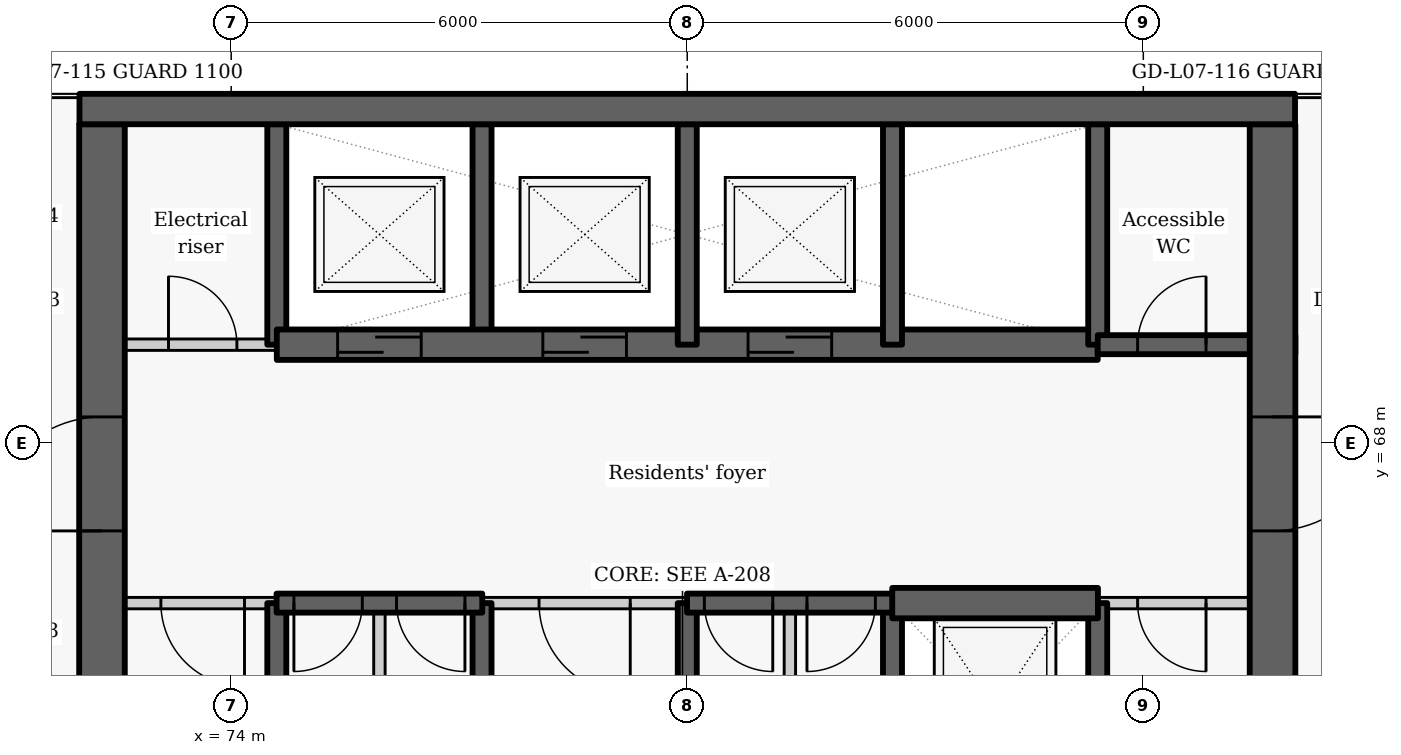
"""IFC4 building model, lengths in metres.
Left out: names, types, materials, properties, quantities, classifications, styles, units other than length and angle.
Written with IfcOpenShell. Run it as: python <this file> out.ifc"""

import sys

from ifc_helpers import new_model, si_unit, direction, frame, frame_2d, origin, place, context, subcontext, project, spatial, rectangle, extrude, element, fill, save


model = new_model("IFC4")
c1 = context("Model", 3, precision=1e-05, world=origin(), true_north=direction((0.0, 1.0)))
c2 = subcontext(c1, "Body", "Model", "MODEL_VIEW")
j1 = project(units=[si_unit("LENGTHUNIT", "METRE"), si_unit("PLANEANGLEUNIT", "RADIAN")], contexts=[c1])
p1 = place(None, origin())
s1 = spatial("IfcSite", under=j1, at=p1, CompositionType="ELEMENT")
p2 = place(p1, origin())
s2 = spatial("IfcBuilding", under=s1, at=p2, CompositionType="ELEMENT")
p3 = place(p2, frame((0.0, 0.0, 31.5)))
s3 = spatial("IfcBuildingStorey", under=s2, at=p3, CompositionType="ELEMENT", Elevation=31.5)
p4 = place(p3, frame((74.6, 63.1, -0.275), z_axis=(0.0, 0.0, 1.0), x_axis=(0.0, 1.0, 0.0)))
e1 = element("IfcWall", 1, at=p4, inside=s3, PredefinedType="SHEAR", context=c2, shape_type="SweptSolid", body=[
    extrude(rectangle(XDim=2.8, YDim=0.25, at=frame_2d((1.4, 0.0))), origin(), (0.0, 0.0, 1.0), 3.3),
])
p5 = place(p3, frame((74.6, 69.3, -0.275), z_axis=(0.0, 0.0, 1.0), x_axis=(0.0, 1.0, 0.0)))
e2 = element("IfcWall", 2, at=p5, inside=s3, PredefinedType="SHEAR", context=c2, shape_type="SweptSolid", body=[
    extrude(rectangle(XDim=2.9, YDim=0.25, at=frame_2d((1.45, 0.0))), origin(), (0.0, 0.0, 1.0), 3.3),
])
p6 = place(p3, frame((72.0, 69.3, 0.0), z_axis=(0.0, 0.0, 1.0), x_axis=(1.0, 0.0, 0.0)))
e3 = element("IfcWall", 3, at=p6, inside=s3, PredefinedType="PARTITIONING", context=c2, shape_type="SweptSolid", body=[
    extrude(rectangle(XDim=2.6, YDim=0.15, at=frame_2d((1.3, 0.0))), origin(), (0.0, 0.0, 1.0), 3.025),
])
p7 = place(p6, frame((1.175, 0.0, 0.0)))
e4 = element("IfcOpeningElement", 4, at=p7, cuts=e3, PredefinedType="OPENING", context=c2, shape_type="SweptSolid", body=[
    extrude(rectangle(XDim=0.9, YDim=2.1, at=frame_2d((0.45, 1.05))), frame((0.0, 0.085, 0.0), z_axis=(0.0, -1.0, 0.0), x_axis=(1.0, 0.0, 0.0)), (0.0, 0.0, 1.0), 0.17),
])
p8 = place(p3, frame((72.3, 63.1, -0.275), z_axis=(0.0, 0.0, 1.0), x_axis=(0.0, 1.0, 0.0)))
e5 = element("IfcWall", 5, at=p8, inside=s3, PredefinedType="SHEAR", context=c2, shape_type="SweptSolid", body=[
    extrude(rectangle(XDim=9.1, YDim=0.6, at=frame_2d((4.55, 0.0))), origin(), (0.0, 0.0, 1.0), 3.3),
])
p9 = place(p8, frame((3.75, 0.0, 0.275)))
e6 = element("IfcOpeningElement", 6, at=p9, cuts=e5, PredefinedType="OPENING", context=c2, shape_type="SweptSolid", body=[
    extrude(rectangle(XDim=1.5, YDim=2.1, at=frame_2d((0.75, 1.05))), frame((0.0, 0.31, 0.0), z_axis=(0.0, -1.0, 0.0), x_axis=(1.0, 0.0, 0.0)), (0.0, 0.0, 1.0), 0.62),
])
p10 = place(p3, frame((77.3, 63.1, -0.275), z_axis=(0.0, 0.0, 1.0), x_axis=(0.0, 1.0, 0.0)))
e7 = element("IfcWall", 7, at=p10, inside=s3, PredefinedType="SHEAR", context=c2, shape_type="SweptSolid", body=[
    extrude(rectangle(XDim=2.8, YDim=0.25, at=frame_2d((1.4, 0.0))), origin(), (0.0, 0.0, 1.0), 3.3),
])
p11 = place(p3, frame((77.3, 69.3, -0.275), z_axis=(0.0, 0.0, 1.0), x_axis=(0.0, 1.0, 0.0)))
e8 = element("IfcWall", 8, at=p11, inside=s3, PredefinedType="SHEAR", context=c2, shape_type="SweptSolid", body=[
    extrude(rectangle(XDim=2.9, YDim=0.25, at=frame_2d((1.45, 0.0))), origin(), (0.0, 0.0, 1.0), 3.3),
])
p12 = place(p3, frame((74.6, 69.3, -0.275), z_axis=(0.0, 0.0, 1.0), x_axis=(1.0, 0.0, 0.0)))
e9 = element("IfcWall", 9, at=p12, inside=s3, PredefinedType="SHEAR", context=c2, shape_type="SweptSolid", body=[
    extrude(rectangle(XDim=10.8, YDim=0.4, at=frame_2d((5.4, 0.0))), origin(), (0.0, 0.0, 1.0), 3.3),
])
p13 = place(p12, frame((0.8, 0.0, 0.275)))
e10 = element("IfcOpeningElement", 10, at=p13, cuts=e9, PredefinedType="OPENING", context=c2, shape_type="SweptSolid", body=[
    extrude(rectangle(XDim=1.1, YDim=2.1, at=frame_2d((0.55, 1.05))), frame((0.0, 0.21, 0.0), z_axis=(0.0, -1.0, 0.0), x_axis=(1.0, 0.0, 0.0)), (0.0, 0.0, 1.0), 0.42),
])
p14 = place(p12, frame((3.5, 0.0, 0.275)))
e11 = element("IfcOpeningElement", 11, at=p14, cuts=e9, PredefinedType="OPENING", context=c2, shape_type="SweptSolid", body=[
    extrude(rectangle(XDim=1.1, YDim=2.1, at=frame_2d((0.55, 1.05))), frame((0.0, 0.21, 0.0), z_axis=(0.0, -1.0, 0.0), x_axis=(1.0, 0.0, 0.0)), (0.0, 0.0, 1.0), 0.42),
])
p15 = place(p12, frame((6.2, 0.0, 0.275)))
e12 = element("IfcOpeningElement", 12, at=p15, cuts=e9, PredefinedType="OPENING", context=c2, shape_type="SweptSolid", body=[
    extrude(rectangle(XDim=1.1, YDim=2.1, at=frame_2d((0.55, 1.05))), frame((0.0, 0.21, 0.0), z_axis=(0.0, -1.0, 0.0), x_axis=(1.0, 0.0, 0.0)), (0.0, 0.0, 1.0), 0.42),
])
p16 = place(p3, frame((80.0, 63.1, -0.275), z_axis=(0.0, 0.0, 1.0), x_axis=(0.0, 1.0, 0.0)))
e13 = element("IfcWall", 13, at=p16, inside=s3, PredefinedType="SHEAR", context=c2, shape_type="SweptSolid", body=[
    extrude(rectangle(XDim=2.8, YDim=0.25, at=frame_2d((1.4, 0.0))), origin(), (0.0, 0.0, 1.0), 3.3),
])
p17 = place(p3, frame((80.0, 69.3, -0.275), z_axis=(0.0, 0.0, 1.0), x_axis=(0.0, 1.0, 0.0)))
e14 = element("IfcWall", 14, at=p17, inside=s3, PredefinedType="SHEAR", context=c2, shape_type="SweptSolid", body=[
    extrude(rectangle(XDim=2.9, YDim=0.25, at=frame_2d((1.45, 0.0))), origin(), (0.0, 0.0, 1.0), 3.3),
])
p18 = place(p3, frame((82.7, 63.1, -0.275), z_axis=(0.0, 0.0, 1.0), x_axis=(0.0, 1.0, 0.0)))
e15 = element("IfcWall", 15, at=p18, inside=s3, PredefinedType="SHEAR", context=c2, shape_type="SweptSolid", body=[
    extrude(rectangle(XDim=2.8, YDim=0.25, at=frame_2d((1.4, 0.0))), origin(), (0.0, 0.0, 1.0), 3.3),
])
p19 = place(p3, frame((82.7, 69.3, -0.275), z_axis=(0.0, 0.0, 1.0), x_axis=(0.0, 1.0, 0.0)))
e16 = element("IfcWall", 16, at=p19, inside=s3, PredefinedType="SHEAR", context=c2, shape_type="SweptSolid", body=[
    extrude(rectangle(XDim=2.9, YDim=0.25, at=frame_2d((1.45, 0.0))), origin(), (0.0, 0.0, 1.0), 3.3),
])
p20 = place(p3, frame((85.4, 63.1, -0.275), z_axis=(0.0, 0.0, 1.0), x_axis=(0.0, 1.0, 0.0)))
e17 = element("IfcWall", 17, at=p20, inside=s3, PredefinedType="SHEAR", context=c2, shape_type="SweptSolid", body=[
    extrude(rectangle(XDim=2.8, YDim=0.25, at=frame_2d((1.4, 0.0))), origin(), (0.0, 0.0, 1.0), 3.3),
])
p21 = place(p3, frame((85.4, 69.3, -0.275), z_axis=(0.0, 0.0, 1.0), x_axis=(0.0, 1.0, 0.0)))
e18 = element("IfcWall", 18, at=p21, inside=s3, PredefinedType="SHEAR", context=c2, shape_type="SweptSolid", body=[
    extrude(rectangle(XDim=2.9, YDim=0.25, at=frame_2d((1.45, 0.0))), origin(), (0.0, 0.0, 1.0), 3.3),
])
p22 = place(p3, frame((85.4, 69.3, -0.275), z_axis=(0.0, 0.0, 1.0), x_axis=(1.0, 0.0, 0.0)))
e19 = element("IfcWall", 19, at=p22, inside=s3, PredefinedType="SHEAR", context=c2, shape_type="SweptSolid", body=[
    extrude(rectangle(XDim=2.6, YDim=0.25, at=frame_2d((1.3, 0.0))), origin(), (0.0, 0.0, 1.0), 3.3),
])
p23 = place(p22, frame((0.525, 0.0, 0.275)))
e20 = element("IfcOpeningElement", 20, at=p23, cuts=e19, PredefinedType="OPENING", context=c2, shape_type="SweptSolid", body=[
    extrude(rectangle(XDim=0.9, YDim=2.1, at=frame_2d((0.45, 1.05))), frame((0.0, 0.135, 0.0), z_axis=(0.0, -1.0, 0.0), x_axis=(1.0, 0.0, 0.0)), (0.0, 0.0, 1.0), 0.27),
])
p24 = place(p3, frame((87.7, 72.2, -0.275), z_axis=(0.0, 0.0, 1.0), x_axis=(0.0, -1.0, 0.0)))
e21 = element("IfcWall", 21, at=p24, inside=s3, PredefinedType="SHEAR", context=c2, shape_type="SweptSolid", body=[
    extrude(rectangle(XDim=15.6, YDim=0.6, at=frame_2d((7.8, 0.0))), origin(), (0.0, 0.0, 1.0), 3.3),
])
p25 = place(p24, frame((3.85, 0.0, 0.275)))
e22 = element("IfcOpeningElement", 22, at=p25, cuts=e21, PredefinedType="OPENING", context=c2, shape_type="SweptSolid", body=[
    extrude(rectangle(XDim=1.5, YDim=2.1, at=frame_2d((0.75, 1.05))), frame((0.0, 0.31, 0.0), z_axis=(0.0, -1.0, 0.0), x_axis=(1.0, 0.0, 0.0)), (0.0, 0.0, 1.0), 0.62),
])
p26 = place(p24, frame((11.8, 0.0, 0.275)))
e23 = element("IfcOpeningElement", 23, at=p26, cuts=e21, PredefinedType="OPENING", context=c2, shape_type="SweptSolid", body=[
    extrude(rectangle(XDim=1.1, YDim=2.1, at=frame_2d((0.55, 1.05))), frame((0.0, 0.31, 0.0), z_axis=(0.0, -1.0, 0.0), x_axis=(1.0, 0.0, 0.0)), (0.0, 0.0, 1.0), 0.62),
])
p27 = place(p3, frame((74.603, 65.9, 0.0), z_axis=(0.0, 0.0, 1.0), x_axis=(-1.0, 0.0, 0.0)))
e24 = element("IfcWall", 24, at=p27, inside=s3, PredefinedType="PARTITIONING", context=c2, shape_type="SweptSolid", body=[
    extrude(rectangle(XDim=2.603, YDim=0.15, at=frame_2d((1.302, 0.0))), origin(), (0.0, 0.0, 1.0), 3.025),
])
p28 = place(p27, frame((0.428, 0.0, 0.0)))
e25 = element("IfcOpeningElement", 25, at=p28, cuts=e24, PredefinedType="OPENING", context=c2, shape_type="SweptSolid", body=[
    extrude(rectangle(XDim=1.1, YDim=2.1, at=frame_2d((0.55, 1.05))), frame((0.0, 0.085, 0.0), z_axis=(0.0, -1.0, 0.0), x_axis=(1.0, 0.0, 0.0)), (0.0, 0.0, 1.0), 0.17),
])
p29 = place(p3, frame((80.003, 65.9, 0.0), z_axis=(0.0, 0.0, 1.0), x_axis=(-1.0, 0.0, 0.0)))
e26 = element("IfcWall", 26, at=p29, inside=s3, PredefinedType="PARTITIONING", context=c2, shape_type="SweptSolid", body=[
    extrude(rectangle(XDim=2.706, YDim=0.15, at=frame_2d((1.353, 0.0))), origin(), (0.0, 0.0, 1.0), 3.025),
])
p30 = place(p29, frame((0.753, 0.0, 0.0)))
e27 = element("IfcOpeningElement", 27, at=p30, cuts=e26, PredefinedType="OPENING", context=c2, shape_type="SweptSolid", body=[
    extrude(rectangle(XDim=1.2, YDim=2.1, at=frame_2d((0.6, 1.05))), frame((0.0, 0.085, 0.0), z_axis=(0.0, -1.0, 0.0), x_axis=(1.0, 0.0, 0.0)), (0.0, 0.0, 1.0), 0.17),
])
p31 = place(p3, frame((88.0, 65.9, 0.0), z_axis=(0.0, 0.0, 1.0), x_axis=(-1.0, 0.0, 0.0)))
e28 = element("IfcWall", 28, at=p31, inside=s3, PredefinedType="PARTITIONING", context=c2, shape_type="SweptSolid", body=[
    extrude(rectangle(XDim=2.603, YDim=0.15, at=frame_2d((1.302, 0.0))), origin(), (0.0, 0.0, 1.0), 3.025),
])
p32 = place(p31, frame((1.175, 0.0, 0.0)))
e29 = element("IfcOpeningElement", 29, at=p32, cuts=e28, PredefinedType="OPENING", context=c2, shape_type="SweptSolid", body=[
    extrude(rectangle(XDim=0.9, YDim=2.1, at=frame_2d((0.45, 1.05))), frame((0.0, 0.085, 0.0), z_axis=(0.0, -1.0, 0.0), x_axis=(1.0, 0.0, 0.0)), (0.0, 0.0, 1.0), 0.17),
])
p33 = place(p3, frame((77.303, 65.9, -0.275), z_axis=(0.0, 0.0, 1.0), x_axis=(-1.0, 0.0, 0.0)))
e30 = element("IfcWall", 30, at=p33, inside=s3, PredefinedType="SHEAR", context=c2, shape_type="SweptSolid", body=[
    extrude(rectangle(XDim=2.706, YDim=0.25, at=frame_2d((1.353, 0.0))), origin(), (0.0, 0.0, 1.0), 3.3),
])
p34 = place(p33, frame((1.578, 0.0, 0.275)))
e31 = element("IfcOpeningElement", 31, at=p34, cuts=e30, PredefinedType="OPENING", context=c2, shape_type="SweptSolid", body=[
    extrude(rectangle(XDim=0.9, YDim=2.1, at=frame_2d((0.45, 1.05))), frame((0.0, 0.135, 0.0), z_axis=(0.0, -1.0, 0.0), x_axis=(1.0, 0.0, 0.0)), (0.0, 0.0, 1.0), 0.27),
])
p35 = place(p33, frame((0.228, 0.0, 0.275)))
e32 = element("IfcOpeningElement", 32, at=p35, cuts=e30, PredefinedType="OPENING", context=c2, shape_type="SweptSolid", body=[
    extrude(rectangle(XDim=0.9, YDim=2.1, at=frame_2d((0.45, 1.05))), frame((0.0, 0.135, 0.0), z_axis=(0.0, -1.0, 0.0), x_axis=(1.0, 0.0, 0.0)), (0.0, 0.0, 1.0), 0.27),
])
p36 = place(p3, frame((82.703, 65.9, -0.275), z_axis=(0.0, 0.0, 1.0), x_axis=(-1.0, 0.0, 0.0)))
e33 = element("IfcWall", 33, at=p36, inside=s3, PredefinedType="SHEAR", context=c2, shape_type="SweptSolid", body=[
    extrude(rectangle(XDim=2.706, YDim=0.25, at=frame_2d((1.353, 0.0))), origin(), (0.0, 0.0, 1.0), 3.3),
])
p37 = place(p36, frame((1.578, 0.0, 0.275)))
e34 = element("IfcOpeningElement", 34, at=p37, cuts=e33, PredefinedType="OPENING", context=c2, shape_type="SweptSolid", body=[
    extrude(rectangle(XDim=0.9, YDim=2.1, at=frame_2d((0.45, 1.05))), frame((0.0, 0.135, 0.0), z_axis=(0.0, -1.0, 0.0), x_axis=(1.0, 0.0, 0.0)), (0.0, 0.0, 1.0), 0.27),
])
p38 = place(p36, frame((0.228, 0.0, 0.275)))
e35 = element("IfcOpeningElement", 35, at=p38, cuts=e33, PredefinedType="OPENING", context=c2, shape_type="SweptSolid", body=[
    extrude(rectangle(XDim=0.9, YDim=2.1, at=frame_2d((0.45, 1.05))), frame((0.0, 0.135, 0.0), z_axis=(0.0, -1.0, 0.0), x_axis=(1.0, 0.0, 0.0)), (0.0, 0.0, 1.0), 0.27),
])
p39 = place(p3, frame((82.697, 65.9, -0.275), z_axis=(0.0, 0.0, 1.0), x_axis=(1.0, 0.0, 0.0)))
e36 = element("IfcWall", 36, at=p39, inside=s3, PredefinedType="SHEAR", context=c2, shape_type="SweptSolid", body=[
    extrude(rectangle(XDim=2.706, YDim=0.4, at=frame_2d((1.353, 0.0))), origin(), (0.0, 0.0, 1.0), 3.3),
])
for number, where, z_axis, x_axis in (
    (37, (75.95, 63.1, 0.0), (0.0, 0.0, 1.0), (0.0, 1.0, 0.0)),
    (38, (81.35, 63.1, 0.0), (0.0, 0.0, 1.0), (0.0, 1.0, 0.0)),
):
    element("IfcWall", number, at=place(p3, frame(where, z_axis=z_axis, x_axis=x_axis)), inside=s3, PredefinedType="PARTITIONING", context=c2, shape_type="SweptSolid", body=[
        extrude(rectangle(XDim=2.8, YDim=0.15, at=frame_2d((1.4, 0.0))), origin(), (0.0, 0.0, 1.0), 3.025),
    ])
p40 = place(p3, frame((72.004, 72.4, -0.275), z_axis=(0.0, 0.0, 1.0), x_axis=(1.0, 0.0, 0.0)))
e39 = element("IfcWall", 39, at=p40, inside=s3, PredefinedType="SHEAR", context=c2, shape_type="SweptSolid", body=[
    extrude(rectangle(XDim=15.992, YDim=0.4, at=frame_2d((7.996, 0.0))), origin(), (0.0, 0.0, 1.0), 3.3),
])
p41 = place(p7, origin())
e40 = element("IfcDoor", 40, at=p41, inside=s3, OperationType="SINGLE_SWING_LEFT", PredefinedType="DOOR", context=c2, shape_type="SweptSolid", body=[
    extrude(rectangle(XDim=0.9, YDim=2.1, at=frame_2d((0.45, 1.05))), frame((0.0, 0.025, 0.0), z_axis=(0.0, -1.0, 0.0), x_axis=(1.0, 0.0, 0.0)), (0.0, 0.0, 1.0), 0.05),
])
fill(e4, e40)
p42 = place(p13, origin())
e41 = element("IfcDoor", 41, at=p42, inside=s3, OperationType="SLIDING_TO_LEFT", PredefinedType="DOOR", context=c2, shape_type="SweptSolid", body=[
    extrude(rectangle(XDim=1.1, YDim=2.1, at=frame_2d((0.55, 1.05))), frame((0.0, 0.025, 0.0), z_axis=(0.0, -1.0, 0.0), x_axis=(1.0, 0.0, 0.0)), (0.0, 0.0, 1.0), 0.05),
])
fill(e10, e41)
p43 = place(p14, origin())
e42 = element("IfcDoor", 42, at=p43, inside=s3, OperationType="SLIDING_TO_LEFT", PredefinedType="DOOR", context=c2, shape_type="SweptSolid", body=[
    extrude(rectangle(XDim=1.1, YDim=2.1, at=frame_2d((0.55, 1.05))), frame((0.0, 0.025, 0.0), z_axis=(0.0, -1.0, 0.0), x_axis=(1.0, 0.0, 0.0)), (0.0, 0.0, 1.0), 0.05),
])
fill(e11, e42)
p44 = place(p15, origin())
e43 = element("IfcDoor", 43, at=p44, inside=s3, OperationType="SLIDING_TO_LEFT", PredefinedType="DOOR", context=c2, shape_type="SweptSolid", body=[
    extrude(rectangle(XDim=1.1, YDim=2.1, at=frame_2d((0.55, 1.05))), frame((0.0, 0.025, 0.0), z_axis=(0.0, -1.0, 0.0), x_axis=(1.0, 0.0, 0.0)), (0.0, 0.0, 1.0), 0.05),
])
fill(e12, e43)
p45 = place(p23, origin())
e44 = element("IfcDoor", 44, at=p45, inside=s3, OperationType="SINGLE_SWING_RIGHT", PredefinedType="DOOR", context=c2, shape_type="SweptSolid", body=[
    extrude(rectangle(XDim=0.9, YDim=2.1, at=frame_2d((0.45, 1.05))), frame((0.0, 0.025, 0.0), z_axis=(0.0, -1.0, 0.0), x_axis=(1.0, 0.0, 0.0)), (0.0, 0.0, 1.0), 0.05),
])
fill(e20, e44)
p46 = place(p28, origin())
e45 = element("IfcDoor", 45, at=p46, inside=s3, OperationType="SINGLE_SWING_LEFT", PredefinedType="DOOR", context=c2, shape_type="SweptSolid", body=[
    extrude(rectangle(XDim=1.1, YDim=2.1, at=frame_2d((0.55, 1.05))), frame((0.0, 0.025, 0.0), z_axis=(0.0, -1.0, 0.0), x_axis=(1.0, 0.0, 0.0)), (0.0, 0.0, 1.0), 0.05),
])
fill(e25, e45)
p47 = place(p34, origin())
e46 = element("IfcDoor", 46, at=p47, inside=s3, OperationType="SINGLE_SWING_RIGHT", PredefinedType="DOOR", context=c2, shape_type="SweptSolid", body=[
    extrude(rectangle(XDim=0.9, YDim=2.1, at=frame_2d((0.45, 1.05))), frame((0.0, 0.025, 0.0), z_axis=(0.0, -1.0, 0.0), x_axis=(1.0, 0.0, 0.0)), (0.0, 0.0, 1.0), 0.05),
])
fill(e31, e46)
p48 = place(p35, origin())
e47 = element("IfcDoor", 47, at=p48, inside=s3, OperationType="SINGLE_SWING_LEFT", PredefinedType="DOOR", context=c2, shape_type="SweptSolid", body=[
    extrude(rectangle(XDim=0.9, YDim=2.1, at=frame_2d((0.45, 1.05))), frame((0.0, 0.025, 0.0), z_axis=(0.0, -1.0, 0.0), x_axis=(1.0, 0.0, 0.0)), (0.0, 0.0, 1.0), 0.05),
])
fill(e32, e47)
p49 = place(p30, origin())
e48 = element("IfcDoor", 48, at=p49, inside=s3, OperationType="DOUBLE_DOOR_SINGLE_SWING", PredefinedType="DOOR", context=c2, shape_type="SweptSolid", body=[
    extrude(rectangle(XDim=1.2, YDim=2.1, at=frame_2d((0.6, 1.05))), frame((0.0, 0.025, 0.0), z_axis=(0.0, -1.0, 0.0), x_axis=(1.0, 0.0, 0.0)), (0.0, 0.0, 1.0), 0.05),
])
fill(e27, e48)
p50 = place(p37, origin())
e49 = element("IfcDoor", 49, at=p50, inside=s3, OperationType="SINGLE_SWING_LEFT", PredefinedType="DOOR", context=c2, shape_type="SweptSolid", body=[
    extrude(rectangle(XDim=0.9, YDim=2.1, at=frame_2d((0.45, 1.05))), frame((0.0, 0.025, 0.0), z_axis=(0.0, -1.0, 0.0), x_axis=(1.0, 0.0, 0.0)), (0.0, 0.0, 1.0), 0.05),
])
fill(e34, e49)
p51 = place(p38, origin())
e50 = element("IfcDoor", 50, at=p51, inside=s3, OperationType="SINGLE_SWING_RIGHT", PredefinedType="DOOR", context=c2, shape_type="SweptSolid", body=[
    extrude(rectangle(XDim=0.9, YDim=2.1, at=frame_2d((0.45, 1.05))), frame((0.0, 0.025, 0.0), z_axis=(0.0, -1.0, 0.0), x_axis=(1.0, 0.0, 0.0)), (0.0, 0.0, 1.0), 0.05),
])
fill(e35, e50)
p52 = place(p32, origin())
e51 = element("IfcDoor", 51, at=p52, inside=s3, OperationType="SINGLE_SWING_LEFT", PredefinedType="DOOR", context=c2, shape_type="SweptSolid", body=[
    extrude(rectangle(XDim=0.9, YDim=2.1, at=frame_2d((0.45, 1.05))), frame((0.0, 0.025, 0.0), z_axis=(0.0, -1.0, 0.0), x_axis=(1.0, 0.0, 0.0)), (0.0, 0.0, 1.0), 0.05),
])
fill(e29, e51)
p53 = place(p25, origin())
e52 = element("IfcDoor", 52, at=p53, inside=s3, OperationType="DOUBLE_DOOR_SINGLE_SWING", PredefinedType="DOOR", context=c2, shape_type="SweptSolid", body=[
    extrude(rectangle(XDim=1.5, YDim=2.1, at=frame_2d((0.75, 1.05))), frame((0.0, 0.025, 0.0), z_axis=(0.0, -1.0, 0.0), x_axis=(1.0, 0.0, 0.0)), (0.0, 0.0, 1.0), 0.05),
])
fill(e22, e52)
p54 = place(p9, origin())
e53 = element("IfcDoor", 53, at=p54, inside=s3, OperationType="DOUBLE_DOOR_SINGLE_SWING", PredefinedType="DOOR", context=c2, shape_type="SweptSolid", body=[
    extrude(rectangle(XDim=1.5, YDim=2.1, at=frame_2d((0.75, 1.05))), frame((0.0, 0.025, 0.0), z_axis=(0.0, -1.0, 0.0), x_axis=(1.0, 0.0, 0.0)), (0.0, 0.0, 1.0), 0.05),
])
fill(e6, e53)
save(model, sys.argv[1])
